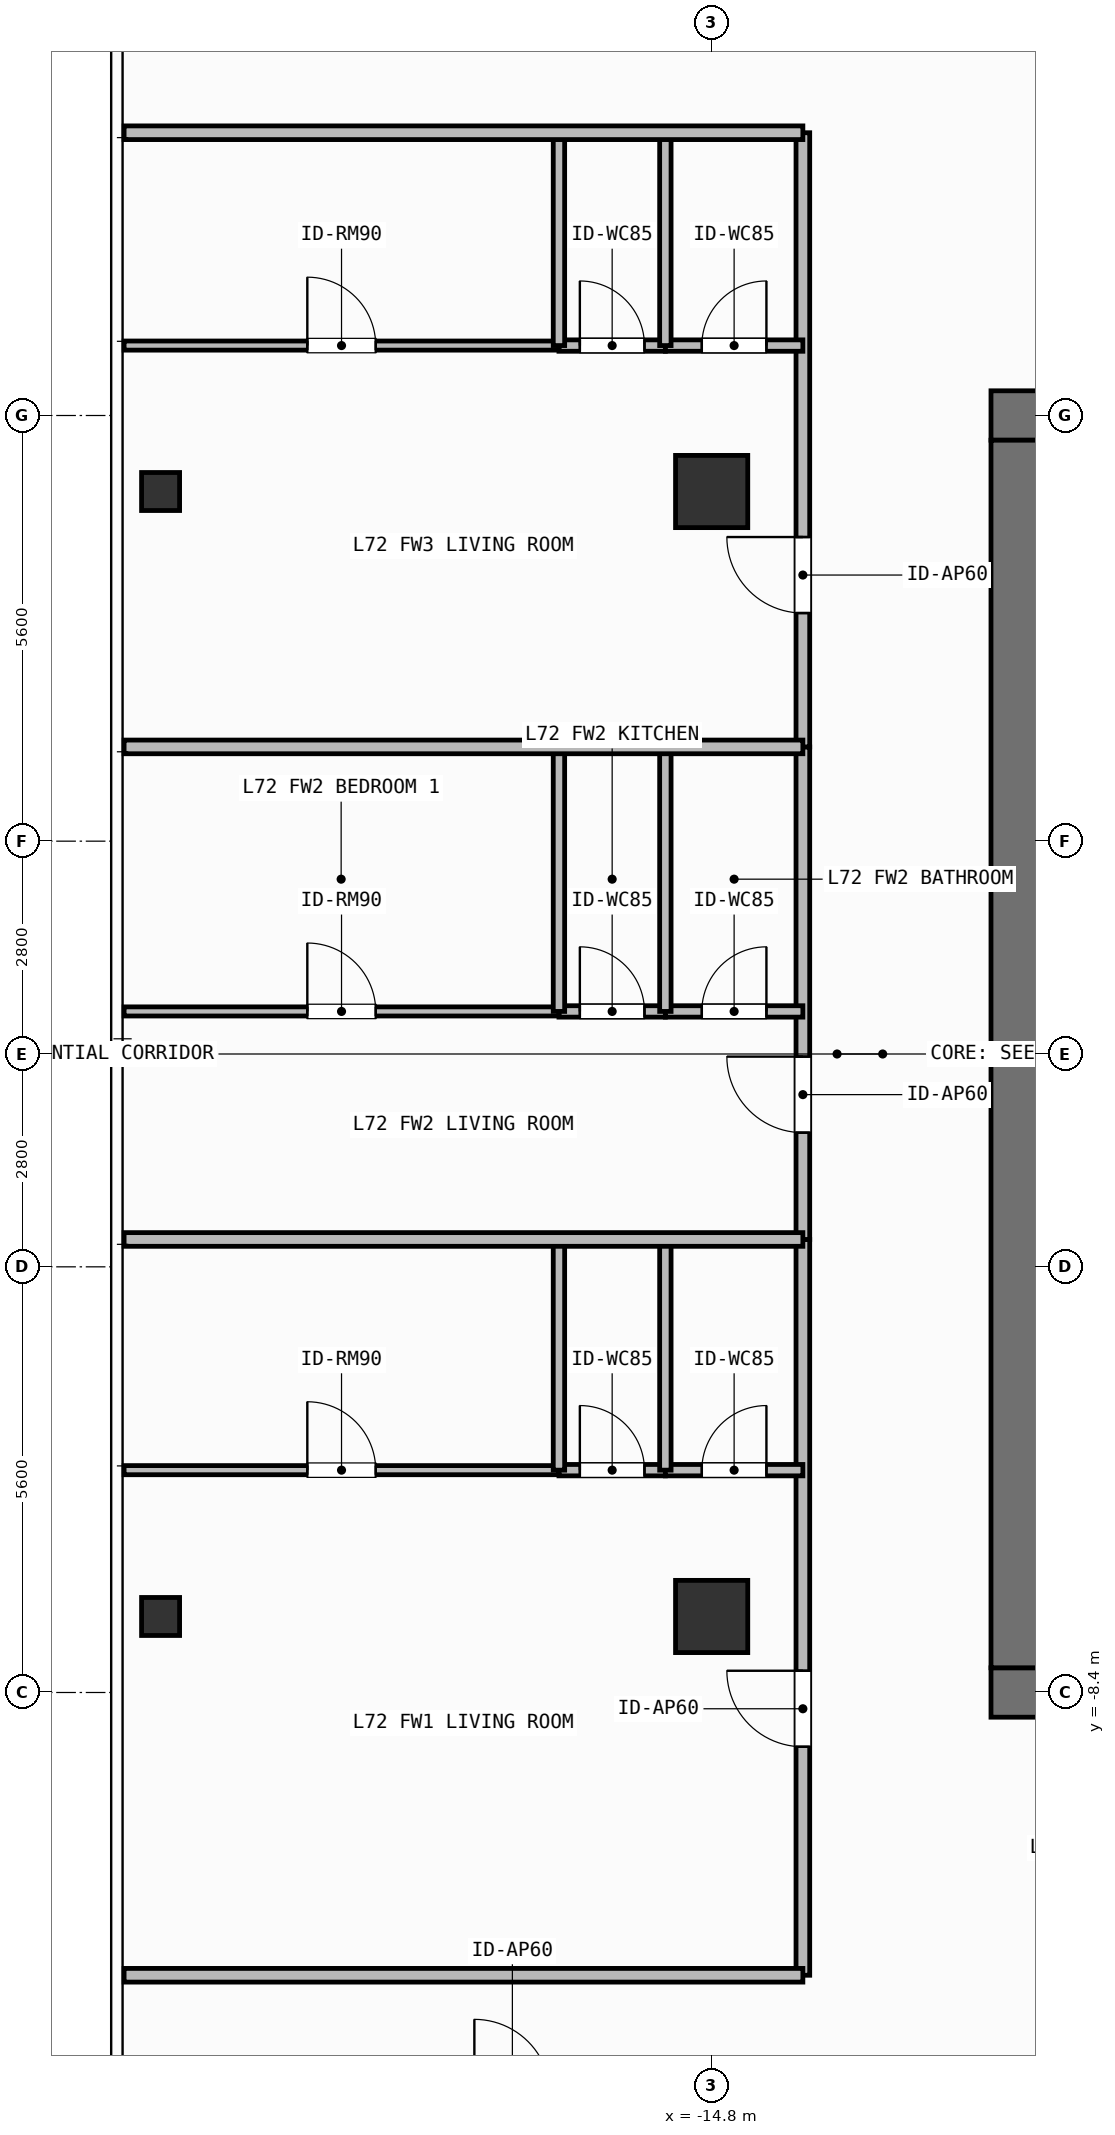
"""IFC4 building model, lengths in metres.
Left out: names, types, materials, properties, quantities, classifications, styles, units other than length and angle.
Written with IfcOpenShell. Run it as: python <this file> out.ifc"""

import sys

from ifc_helpers import new_model, si_unit, direction, frame, frame_2d, origin, origin_2d, place, context, subcontext, project, spatial, rectangle, hollow_rectangle, extrude, element, fill, save


model = new_model("IFC4")
c1 = context("Model", 3, precision=1e-05, world=origin(), true_north=direction((0.0, 1.0)))
c2 = subcontext(c1, "Body", "Model", "MODEL_VIEW")
j1 = project(units=[si_unit("LENGTHUNIT", "METRE"), si_unit("PLANEANGLEUNIT", "RADIAN")], contexts=[c1])
p1 = place(None, origin())
s1 = spatial("IfcSite", under=j1, at=p1, CompositionType="ELEMENT")
p2 = place(p1, origin())
s2 = spatial("IfcBuilding", under=s1, at=p2, CompositionType="ELEMENT")
p3 = place(p2, frame((0.0, 0.0, 293.7)))
s3 = spatial("IfcBuildingStorey", under=s2, at=p3, CompositionType="ELEMENT", Elevation=293.7)
for number, where, z_axis, x_axis in (
    (1, (-11.125, -8.4, 0.0), (0.0, 0.0, 1.0), (1.0, 0.0, 0.0)),
    (2, (-11.125, 8.4, 0.0), (0.0, 0.0, 1.0), (1.0, 0.0, 0.0)),
):
    element("IfcWall", number, at=place(p3, frame(where, z_axis=z_axis, x_axis=x_axis)), inside=s3, PredefinedType="SHEAR", context=c2, shape_type="SweptSolid", body=[
        extrude(rectangle(XDim=1.425, YDim=0.65, at=frame_2d((0.712, 0.0))), origin(), (0.0, 0.0, 1.0), 3.9),
    ])
p4 = place(p3, frame((-10.8, -8.075, 0.0), z_axis=(0.0, 0.0, 1.0), x_axis=(0.0, 1.0, 0.0)))
e3 = element("IfcWall", 3, at=p4, inside=s3, PredefinedType="SHEAR", context=c2, shape_type="SweptSolid", body=[
    extrude(rectangle(XDim=16.15, YDim=0.65, at=frame_2d((8.075, 0.0))), origin(), (0.0, 0.0, 1.0), 3.9),
])
for number, where, z_axis, x_axis in (
    (4, (-14.8, -7.4, 0.0), (0.0, 0.0, 1.0), (1.0, 0.0, 0.0)),
    (5, (-14.8, 7.4, 0.0), (0.0, 0.0, 1.0), (1.0, 0.0, 0.0)),
):
    element("IfcColumn", number, at=place(p3, frame(where, z_axis=z_axis, x_axis=x_axis)), inside=s3, PredefinedType="COLUMN", context=c2, shape_type="SweptSolid", body=[
        extrude(rectangle(XDim=0.95, YDim=0.95, at=origin_2d()), origin(), (0.0, 0.0, 1.0), 3.9),
    ])
for number, where, z_axis, x_axis in (
    (6, (-22.05, -7.4, 0.0), (0.0, 0.0, 1.0), (1.0, 0.0, 0.0)),
    (7, (-22.05, 7.4, 0.0), (0.0, 0.0, 1.0), (1.0, 0.0, 0.0)),
):
    element("IfcColumn", number, at=place(p3, frame(where, z_axis=z_axis, x_axis=x_axis)), inside=s3, PredefinedType="COLUMN", context=c2, shape_type="SweptSolid", body=[
        extrude(hollow_rectangle(XDim=0.5, YDim=0.5, WallThickness=0.025, at=origin_2d()), origin(), (0.0, 0.0, 1.0), 3.9),
    ])
p5 = place(p3, frame((-13.6, -12.12, 0.0), z_axis=(0.0, 0.0, 1.0), x_axis=(0.0, 1.0, 0.0)))
e8 = element("IfcWall", 8, at=p5, inside=s3, PredefinedType="PARTITIONING", context=c2, shape_type="SweptSolid", body=[
    extrude(rectangle(XDim=9.68, YDim=0.18, at=frame_2d((4.84, 0.0))), origin(), (0.0, 0.0, 1.0), 3.68),
])
p6 = place(p5, frame((3.006, 0.0, 0.0)))
e9 = element("IfcOpeningElement", 9, at=p6, cuts=e8, PredefinedType="OPENING", context=c2, shape_type="SweptSolid", body=[
    extrude(rectangle(XDim=1.0, YDim=2.2, at=frame_2d((0.5, 1.1))), frame((0.0, 0.1, 0.0), z_axis=(0.0, -1.0, 0.0), x_axis=(1.0, 0.0, 0.0)), (0.0, 0.0, 1.0), 0.2),
])
p7 = place(p3, frame((-16.809, -5.475, 0.0), z_axis=(0.0, 0.0, 1.0), x_axis=(1.0, 0.0, 0.0)))
e10 = element("IfcWall", 10, at=p7, inside=s3, PredefinedType="PARTITIONING", context=c2, shape_type="SweptSolid", body=[
    extrude(rectangle(XDim=1.4, YDim=0.15, at=frame_2d((0.7, 0.0))), origin(), (0.0, 0.0, 1.0), 3.68),
])
p8 = place(p7, frame((0.275, 0.0, 0.0)))
e11 = element("IfcOpeningElement", 11, at=p8, cuts=e10, PredefinedType="OPENING", context=c2, shape_type="SweptSolid", body=[
    extrude(rectangle(XDim=0.85, YDim=2.1, at=frame_2d((0.425, 1.05))), frame((0.0, 0.085, 0.0), z_axis=(0.0, -1.0, 0.0), x_axis=(1.0, 0.0, 0.0)), (0.0, 0.0, 1.0), 0.17),
])
p9 = place(p3, frame((-15.409, -5.475, 0.0), z_axis=(0.0, 0.0, 1.0), x_axis=(1.0, 0.0, 0.0)))
e12 = element("IfcWall", 12, at=p9, inside=s3, PredefinedType="PARTITIONING", context=c2, shape_type="SweptSolid", body=[
    extrude(rectangle(XDim=1.809, YDim=0.15, at=frame_2d((0.904, 0.0))), origin(), (0.0, 0.0, 1.0), 3.68),
])
p10 = place(p9, frame((0.479, 0.0, 0.0)))
e13 = element("IfcOpeningElement", 13, at=p10, cuts=e12, PredefinedType="OPENING", context=c2, shape_type="SweptSolid", body=[
    extrude(rectangle(XDim=0.85, YDim=2.1, at=frame_2d((0.425, 1.05))), frame((0.0, 0.085, 0.0), z_axis=(0.0, -1.0, 0.0), x_axis=(1.0, 0.0, 0.0)), (0.0, 0.0, 1.0), 0.17),
])
p11 = place(p3, frame((-22.53, -5.475, 0.0), z_axis=(0.0, 0.0, 1.0), x_axis=(1.0, 0.0, 0.0)))
e14 = element("IfcWall", 14, at=p11, inside=s3, PredefinedType="PARTITIONING", context=c2, shape_type="SweptSolid", body=[
    extrude(rectangle(XDim=5.721, YDim=0.12, at=frame_2d((2.86, 0.0))), origin(), (0.0, 0.0, 1.0), 3.68),
])
p12 = place(p11, frame((2.41, 0.0, 0.0)))
e15 = element("IfcOpeningElement", 15, at=p12, cuts=e14, PredefinedType="OPENING", context=c2, shape_type="SweptSolid", body=[
    extrude(rectangle(XDim=0.9, YDim=2.1, at=frame_2d((0.45, 1.05))), frame((0.0, 0.07, 0.0), z_axis=(0.0, -1.0, 0.0), x_axis=(1.0, 0.0, 0.0)), (0.0, 0.0, 1.0), 0.14),
])
p13 = place(p3, frame((-13.6, -2.44, 0.0), z_axis=(0.0, 0.0, 1.0), x_axis=(0.0, 1.0, 0.0)))
e16 = element("IfcWall", 16, at=p13, inside=s3, PredefinedType="PARTITIONING", context=c2, shape_type="SweptSolid", body=[
    extrude(rectangle(XDim=6.48, YDim=0.18, at=frame_2d((3.24, 0.0))), origin(), (0.0, 0.0, 1.0), 3.68),
])
p14 = place(p13, frame((1.406, 0.0, 0.0)))
e17 = element("IfcOpeningElement", 17, at=p14, cuts=e16, PredefinedType="OPENING", context=c2, shape_type="SweptSolid", body=[
    extrude(rectangle(XDim=1.0, YDim=2.2, at=frame_2d((0.5, 1.1))), frame((0.0, 0.1, 0.0), z_axis=(0.0, -1.0, 0.0), x_axis=(1.0, 0.0, 0.0)), (0.0, 0.0, 1.0), 0.2),
])
p15 = place(p3, frame((-16.809, 0.56, 0.0), z_axis=(0.0, 0.0, 1.0), x_axis=(1.0, 0.0, 0.0)))
e18 = element("IfcWall", 18, at=p15, inside=s3, PredefinedType="PARTITIONING", context=c2, shape_type="SweptSolid", body=[
    extrude(rectangle(XDim=1.4, YDim=0.15, at=frame_2d((0.7, 0.0))), origin(), (0.0, 0.0, 1.0), 3.68),
])
p16 = place(p15, frame((0.275, 0.0, 0.0)))
e19 = element("IfcOpeningElement", 19, at=p16, cuts=e18, PredefinedType="OPENING", context=c2, shape_type="SweptSolid", body=[
    extrude(rectangle(XDim=0.85, YDim=2.1, at=frame_2d((0.425, 1.05))), frame((0.0, 0.085, 0.0), z_axis=(0.0, -1.0, 0.0), x_axis=(1.0, 0.0, 0.0)), (0.0, 0.0, 1.0), 0.17),
])
p17 = place(p3, frame((-15.409, 0.56, 0.0), z_axis=(0.0, 0.0, 1.0), x_axis=(1.0, 0.0, 0.0)))
e20 = element("IfcWall", 20, at=p17, inside=s3, PredefinedType="PARTITIONING", context=c2, shape_type="SweptSolid", body=[
    extrude(rectangle(XDim=1.809, YDim=0.15, at=frame_2d((0.904, 0.0))), origin(), (0.0, 0.0, 1.0), 3.68),
])
p18 = place(p17, frame((0.479, 0.0, 0.0)))
e21 = element("IfcOpeningElement", 21, at=p18, cuts=e20, PredefinedType="OPENING", context=c2, shape_type="SweptSolid", body=[
    extrude(rectangle(XDim=0.85, YDim=2.1, at=frame_2d((0.425, 1.05))), frame((0.0, 0.085, 0.0), z_axis=(0.0, -1.0, 0.0), x_axis=(1.0, 0.0, 0.0)), (0.0, 0.0, 1.0), 0.17),
])
p19 = place(p3, frame((-22.53, 0.56, 0.0), z_axis=(0.0, 0.0, 1.0), x_axis=(1.0, 0.0, 0.0)))
e22 = element("IfcWall", 22, at=p19, inside=s3, PredefinedType="PARTITIONING", context=c2, shape_type="SweptSolid", body=[
    extrude(rectangle(XDim=5.721, YDim=0.12, at=frame_2d((2.86, 0.0))), origin(), (0.0, 0.0, 1.0), 3.68),
])
p20 = place(p19, frame((2.41, 0.0, 0.0)))
e23 = element("IfcOpeningElement", 23, at=p20, cuts=e22, PredefinedType="OPENING", context=c2, shape_type="SweptSolid", body=[
    extrude(rectangle(XDim=0.9, YDim=2.1, at=frame_2d((0.45, 1.05))), frame((0.0, 0.07, 0.0), z_axis=(0.0, -1.0, 0.0), x_axis=(1.0, 0.0, 0.0)), (0.0, 0.0, 1.0), 0.14),
])
p21 = place(p3, frame((-13.6, 4.04, 0.0), z_axis=(0.0, 0.0, 1.0), x_axis=(0.0, 1.0, 0.0)))
e24 = element("IfcWall", 24, at=p21, inside=s3, PredefinedType="PARTITIONING", context=c2, shape_type="SweptSolid", body=[
    extrude(rectangle(XDim=8.08, YDim=0.18, at=frame_2d((4.04, 0.0))), origin(), (0.0, 0.0, 1.0), 3.68),
])
p22 = place(p21, frame((1.761, 0.0, 0.0)))
e25 = element("IfcOpeningElement", 25, at=p22, cuts=e24, PredefinedType="OPENING", context=c2, shape_type="SweptSolid", body=[
    extrude(rectangle(XDim=1.0, YDim=2.2, at=frame_2d((0.5, 1.1))), frame((0.0, 0.1, 0.0), z_axis=(0.0, -1.0, 0.0), x_axis=(1.0, 0.0, 0.0)), (0.0, 0.0, 1.0), 0.2),
])
p23 = place(p3, frame((-16.809, 9.32, 0.0), z_axis=(0.0, 0.0, 1.0), x_axis=(1.0, 0.0, 0.0)))
e26 = element("IfcWall", 26, at=p23, inside=s3, PredefinedType="PARTITIONING", context=c2, shape_type="SweptSolid", body=[
    extrude(rectangle(XDim=1.4, YDim=0.15, at=frame_2d((0.7, 0.0))), origin(), (0.0, 0.0, 1.0), 3.68),
])
p24 = place(p23, frame((0.275, 0.0, 0.0)))
e27 = element("IfcOpeningElement", 27, at=p24, cuts=e26, PredefinedType="OPENING", context=c2, shape_type="SweptSolid", body=[
    extrude(rectangle(XDim=0.85, YDim=2.1, at=frame_2d((0.425, 1.05))), frame((0.0, 0.085, 0.0), z_axis=(0.0, -1.0, 0.0), x_axis=(1.0, 0.0, 0.0)), (0.0, 0.0, 1.0), 0.17),
])
p25 = place(p3, frame((-15.409, 9.32, 0.0), z_axis=(0.0, 0.0, 1.0), x_axis=(1.0, 0.0, 0.0)))
e28 = element("IfcWall", 28, at=p25, inside=s3, PredefinedType="PARTITIONING", context=c2, shape_type="SweptSolid", body=[
    extrude(rectangle(XDim=1.809, YDim=0.15, at=frame_2d((0.904, 0.0))), origin(), (0.0, 0.0, 1.0), 3.68),
])
p26 = place(p25, frame((0.479, 0.0, 0.0)))
e29 = element("IfcOpeningElement", 29, at=p26, cuts=e28, PredefinedType="OPENING", context=c2, shape_type="SweptSolid", body=[
    extrude(rectangle(XDim=0.85, YDim=2.1, at=frame_2d((0.425, 1.05))), frame((0.0, 0.085, 0.0), z_axis=(0.0, -1.0, 0.0), x_axis=(1.0, 0.0, 0.0)), (0.0, 0.0, 1.0), 0.17),
])
p27 = place(p3, frame((-22.53, 9.32, 0.0), z_axis=(0.0, 0.0, 1.0), x_axis=(1.0, 0.0, 0.0)))
e30 = element("IfcWall", 30, at=p27, inside=s3, PredefinedType="PARTITIONING", context=c2, shape_type="SweptSolid", body=[
    extrude(rectangle(XDim=5.721, YDim=0.12, at=frame_2d((2.86, 0.0))), origin(), (0.0, 0.0, 1.0), 3.68),
])
p28 = place(p27, frame((2.41, 0.0, 0.0)))
e31 = element("IfcOpeningElement", 31, at=p28, cuts=e30, PredefinedType="OPENING", context=c2, shape_type="SweptSolid", body=[
    extrude(rectangle(XDim=0.9, YDim=2.1, at=frame_2d((0.45, 1.05))), frame((0.0, 0.07, 0.0), z_axis=(0.0, -1.0, 0.0), x_axis=(1.0, 0.0, 0.0)), (0.0, 0.0, 1.0), 0.14),
])
for number, where, z_axis, x_axis in (
    (32, (-15.409, -5.475, 0.0), (0.0, 0.0, 1.0), (0.0, 1.0, 0.0)),
    (33, (-16.809, -5.475, 0.0), (0.0, 0.0, 1.0), (0.0, 1.0, 0.0)),
):
    element("IfcWall", number, at=place(p3, frame(where, z_axis=z_axis, x_axis=x_axis)), inside=s3, PredefinedType="PARTITIONING", context=c2, shape_type="SweptSolid", body=[
        extrude(rectangle(XDim=3.035, YDim=0.15, at=frame_2d((1.518, 0.0))), origin(), (0.0, 0.0, 1.0), 3.68),
    ])
for number, where, z_axis, x_axis in (
    (34, (-15.409, 0.56, 0.0), (0.0, 0.0, 1.0), (0.0, 1.0, 0.0)),
    (35, (-16.809, 0.56, 0.0), (0.0, 0.0, 1.0), (0.0, 1.0, 0.0)),
):
    element("IfcWall", number, at=place(p3, frame(where, z_axis=z_axis, x_axis=x_axis)), inside=s3, PredefinedType="PARTITIONING", context=c2, shape_type="SweptSolid", body=[
        extrude(rectangle(XDim=3.48, YDim=0.15, at=frame_2d((1.74, 0.0))), origin(), (0.0, 0.0, 1.0), 3.68),
    ])
p29 = place(p3, frame((-22.53, -2.44, 0.0), z_axis=(0.0, 0.0, 1.0), x_axis=(1.0, 0.0, 0.0)))
e36 = element("IfcWall", 36, at=p29, inside=s3, PredefinedType="PARTITIONING", context=c2, shape_type="SweptSolid", body=[
    extrude(rectangle(XDim=8.93, YDim=0.18, at=frame_2d((4.465, 0.0))), origin(), (0.0, 0.0, 1.0), 3.68),
])
for number, where, z_axis, x_axis in (
    (37, (-15.409, 9.32, 0.0), (0.0, 0.0, 1.0), (0.0, 1.0, 0.0)),
    (38, (-16.809, 9.32, 0.0), (0.0, 0.0, 1.0), (0.0, 1.0, 0.0)),
):
    element("IfcWall", number, at=place(p3, frame(where, z_axis=z_axis, x_axis=x_axis)), inside=s3, PredefinedType="PARTITIONING", context=c2, shape_type="SweptSolid", body=[
        extrude(rectangle(XDim=2.8, YDim=0.15, at=frame_2d((1.4, 0.0))), origin(), (0.0, 0.0, 1.0), 3.68),
    ])
for number, where, z_axis, x_axis in (
    (39, (-22.53, 4.04, 0.0), (0.0, 0.0, 1.0), (1.0, 0.0, 0.0)),
    (40, (-22.53, -12.12, 0.0), (0.0, 0.0, 1.0), (1.0, 0.0, 0.0)),
    (41, (-22.53, 12.12, 0.0), (0.0, 0.0, 1.0), (1.0, 0.0, 0.0)),
):
    element("IfcWall", number, at=place(p3, frame(where, z_axis=z_axis, x_axis=x_axis)), inside=s3, PredefinedType="PARTITIONING", context=c2, shape_type="SweptSolid", body=[
        extrude(rectangle(XDim=8.93, YDim=0.18, at=frame_2d((4.465, 0.0))), origin(), (0.0, 0.0, 1.0), 3.68),
    ])
p30 = place(p6, origin())
e42 = element("IfcDoor", 42, at=p30, inside=s3, OperationType="SINGLE_SWING_RIGHT", PredefinedType="DOOR", context=c2, shape_type="SweptSolid", body=[
    extrude(rectangle(XDim=1.0, YDim=2.2, at=frame_2d((0.5, 1.1))), frame((0.0, 0.025, 0.0), z_axis=(0.0, -1.0, 0.0), x_axis=(1.0, 0.0, 0.0)), (0.0, 0.0, 1.0), 0.05),
])
fill(e9, e42)
p31 = place(p8, origin())
e43 = element("IfcDoor", 43, at=p31, inside=s3, OperationType="SINGLE_SWING_LEFT", PredefinedType="DOOR", context=c2, shape_type="SweptSolid", body=[
    extrude(rectangle(XDim=0.85, YDim=2.1, at=frame_2d((0.425, 1.05))), frame((0.0, 0.025, 0.0), z_axis=(0.0, -1.0, 0.0), x_axis=(1.0, 0.0, 0.0)), (0.0, 0.0, 1.0), 0.05),
])
fill(e11, e43)
p32 = place(p10, origin())
e44 = element("IfcDoor", 44, at=p32, inside=s3, OperationType="SINGLE_SWING_RIGHT", PredefinedType="DOOR", context=c2, shape_type="SweptSolid", body=[
    extrude(rectangle(XDim=0.85, YDim=2.1, at=frame_2d((0.425, 1.05))), frame((0.0, 0.025, 0.0), z_axis=(0.0, -1.0, 0.0), x_axis=(1.0, 0.0, 0.0)), (0.0, 0.0, 1.0), 0.05),
])
fill(e13, e44)
p33 = place(p12, origin())
e45 = element("IfcDoor", 45, at=p33, inside=s3, OperationType="SINGLE_SWING_LEFT", PredefinedType="DOOR", context=c2, shape_type="SweptSolid", body=[
    extrude(rectangle(XDim=0.9, YDim=2.1, at=frame_2d((0.45, 1.05))), frame((0.0, 0.025, 0.0), z_axis=(0.0, -1.0, 0.0), x_axis=(1.0, 0.0, 0.0)), (0.0, 0.0, 1.0), 0.05),
])
fill(e15, e45)
p34 = place(p14, origin())
e46 = element("IfcDoor", 46, at=p34, inside=s3, OperationType="SINGLE_SWING_RIGHT", PredefinedType="DOOR", context=c2, shape_type="SweptSolid", body=[
    extrude(rectangle(XDim=1.0, YDim=2.2, at=frame_2d((0.5, 1.1))), frame((0.0, 0.025, 0.0), z_axis=(0.0, -1.0, 0.0), x_axis=(1.0, 0.0, 0.0)), (0.0, 0.0, 1.0), 0.05),
])
fill(e17, e46)
p35 = place(p16, origin())
e47 = element("IfcDoor", 47, at=p35, inside=s3, OperationType="SINGLE_SWING_LEFT", PredefinedType="DOOR", context=c2, shape_type="SweptSolid", body=[
    extrude(rectangle(XDim=0.85, YDim=2.1, at=frame_2d((0.425, 1.05))), frame((0.0, 0.025, 0.0), z_axis=(0.0, -1.0, 0.0), x_axis=(1.0, 0.0, 0.0)), (0.0, 0.0, 1.0), 0.05),
])
fill(e19, e47)
p36 = place(p18, origin())
e48 = element("IfcDoor", 48, at=p36, inside=s3, OperationType="SINGLE_SWING_RIGHT", PredefinedType="DOOR", context=c2, shape_type="SweptSolid", body=[
    extrude(rectangle(XDim=0.85, YDim=2.1, at=frame_2d((0.425, 1.05))), frame((0.0, 0.025, 0.0), z_axis=(0.0, -1.0, 0.0), x_axis=(1.0, 0.0, 0.0)), (0.0, 0.0, 1.0), 0.05),
])
fill(e21, e48)
p37 = place(p20, origin())
e49 = element("IfcDoor", 49, at=p37, inside=s3, OperationType="SINGLE_SWING_LEFT", PredefinedType="DOOR", context=c2, shape_type="SweptSolid", body=[
    extrude(rectangle(XDim=0.9, YDim=2.1, at=frame_2d((0.45, 1.05))), frame((0.0, 0.025, 0.0), z_axis=(0.0, -1.0, 0.0), x_axis=(1.0, 0.0, 0.0)), (0.0, 0.0, 1.0), 0.05),
])
fill(e23, e49)
p38 = place(p22, origin())
e50 = element("IfcDoor", 50, at=p38, inside=s3, OperationType="SINGLE_SWING_RIGHT", PredefinedType="DOOR", context=c2, shape_type="SweptSolid", body=[
    extrude(rectangle(XDim=1.0, YDim=2.2, at=frame_2d((0.5, 1.1))), frame((0.0, 0.025, 0.0), z_axis=(0.0, -1.0, 0.0), x_axis=(1.0, 0.0, 0.0)), (0.0, 0.0, 1.0), 0.05),
])
fill(e25, e50)
p39 = place(p24, origin())
e51 = element("IfcDoor", 51, at=p39, inside=s3, OperationType="SINGLE_SWING_LEFT", PredefinedType="DOOR", context=c2, shape_type="SweptSolid", body=[
    extrude(rectangle(XDim=0.85, YDim=2.1, at=frame_2d((0.425, 1.05))), frame((0.0, 0.025, 0.0), z_axis=(0.0, -1.0, 0.0), x_axis=(1.0, 0.0, 0.0)), (0.0, 0.0, 1.0), 0.05),
])
fill(e27, e51)
p40 = place(p26, origin())
e52 = element("IfcDoor", 52, at=p40, inside=s3, OperationType="SINGLE_SWING_RIGHT", PredefinedType="DOOR", context=c2, shape_type="SweptSolid", body=[
    extrude(rectangle(XDim=0.85, YDim=2.1, at=frame_2d((0.425, 1.05))), frame((0.0, 0.025, 0.0), z_axis=(0.0, -1.0, 0.0), x_axis=(1.0, 0.0, 0.0)), (0.0, 0.0, 1.0), 0.05),
])
fill(e29, e52)
p41 = place(p28, origin())
e53 = element("IfcDoor", 53, at=p41, inside=s3, OperationType="SINGLE_SWING_LEFT", PredefinedType="DOOR", context=c2, shape_type="SweptSolid", body=[
    extrude(rectangle(XDim=0.9, YDim=2.1, at=frame_2d((0.45, 1.05))), frame((0.0, 0.025, 0.0), z_axis=(0.0, -1.0, 0.0), x_axis=(1.0, 0.0, 0.0)), (0.0, 0.0, 1.0), 0.05),
])
fill(e31, e53)
save(model, sys.argv[1])
